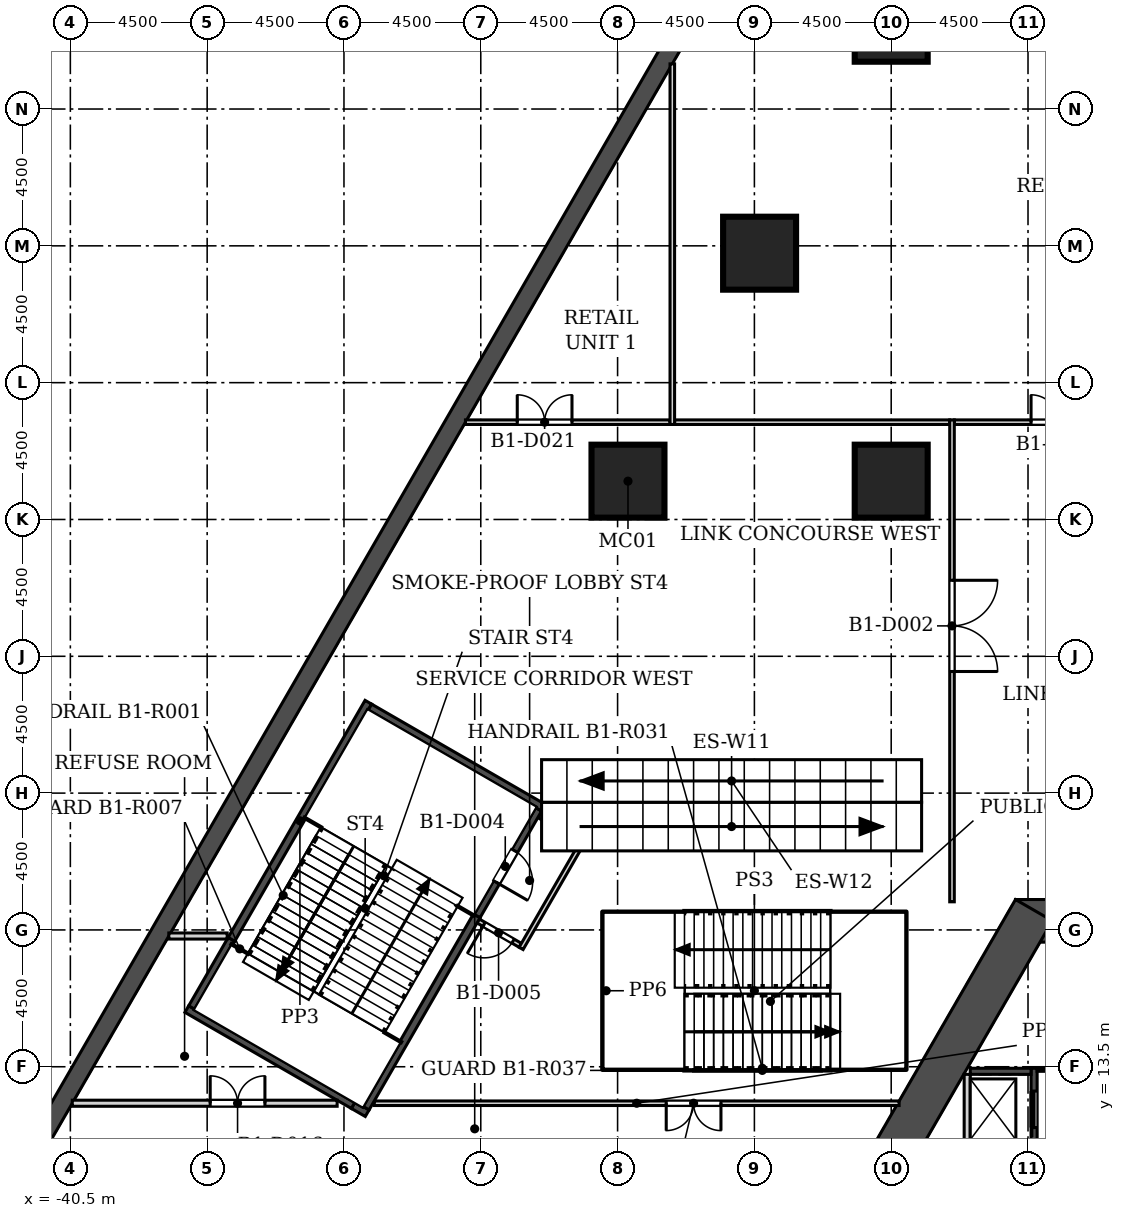
"""IFC4 building model, lengths in metres.
Left out: names, types, materials, properties, quantities, classifications, styles, units other than length and angle.
Written with IfcOpenShell. Run it as: python <this file> out.ifc"""

import sys

from ifc_helpers import new_model, si_unit, direction, frame, frame_2d, origin, origin_2d, place, context, subcontext, project, spatial, rectangle, extrude, element, fill, save


model = new_model("IFC4")
c1 = context("Model", 3, precision=1e-05, world=origin(), true_north=direction((0.0, 1.0)))
c2 = subcontext(c1, "Body", "Model", "MODEL_VIEW")
j1 = project(units=[si_unit("LENGTHUNIT", "METRE"), si_unit("PLANEANGLEUNIT", "RADIAN")], contexts=[c1])
p1 = place(None, origin())
s1 = spatial("IfcSite", under=j1, at=p1, CompositionType="ELEMENT")
p2 = place(p1, origin())
s2 = spatial("IfcBuilding", under=s1, at=p2, CompositionType="ELEMENT")
p3 = place(p2, frame((0.0, 0.0, -8.0)))
s3 = spatial("IfcBuildingStorey", under=s2, at=p3, CompositionType="ELEMENT", Elevation=-8.0)
p4 = place(p3, frame((-4.856, 74.528, 0.0), z_axis=(0.0, 0.0, 1.0), x_axis=(-0.499999312333, -0.866025800809, 0.0)))
e1 = element("IfcWall", 1, at=p4, inside=s3, PredefinedType="SOLIDWALL", context=c2, shape_type="SweptSolid", body=[
    extrude(rectangle(XDim=76.231, YDim=0.6, at=frame_2d((38.115, 0.0))), origin(), (0.0, 0.0, 1.0), 7.6),
])
for number, where, z_axis, x_axis in (
    (2, (-22.158, 32.76, 0.0), (0.0, 0.0, 1.0), (1.0, 0.0, 0.0)),
    (3, (-13.5, 47.756, 0.0), (0.0, 0.0, 1.0), (1.0, 0.0, 0.0)),
    (4, (-13.5, 32.76, 0.0), (0.0, 0.0, 1.0), (1.0, 0.0, 0.0)),
    (5, (-17.829, 40.258, 0.0), (0.0, 0.0, 1.0), (1.0, 0.0, 0.0)),
):
    element("IfcColumn", number, at=place(p3, frame(where, z_axis=z_axis, x_axis=x_axis)), inside=s3, PredefinedType="COLUMN", context=c2, shape_type="SweptSolid", body=[
        extrude(rectangle(XDim=2.4, YDim=2.4, at=origin_2d()), origin(), (0.0, 0.0, 1.0), 8.0),
    ])
p5 = place(p3, frame((9.412, 18.3, 0.0), z_axis=(0.0, 0.0, 1.0), x_axis=(-1.0, 0.0, 0.0)))
e6 = element("IfcWall", 6, at=p5, inside=s3, PredefinedType="SHEAR", context=c2, shape_type="SweptSolid", body=[
    extrude(rectangle(XDim=18.823, YDim=1.4, at=frame_2d((9.412, 0.0))), origin(), (0.0, 0.0, 1.0), 8.0),
])
p6 = place(p5, frame((8.711, 0.0, 0.0)))
e7 = element("IfcOpeningElement", 7, at=p6, cuts=e6, PredefinedType="OPENING", context=c2, shape_type="SweptSolid", body=[
    extrude(rectangle(XDim=1.4, YDim=2.1, at=frame_2d((0.7, 1.05))), frame((0.0, 0.71, 0.0), z_axis=(0.0, -1.0, 0.0), x_axis=(1.0, 0.0, 0.0)), (0.0, 0.0, 1.0), 1.42),
])
p7 = place(p5, frame((11.412, 0.0, 0.0)))
e8 = element("IfcOpeningElement", 8, at=p7, cuts=e6, PredefinedType="OPENING", context=c2, shape_type="SweptSolid", body=[
    extrude(rectangle(XDim=6.0, YDim=2.4, at=frame_2d((3.0, 1.2))), frame((0.0, 0.71, 0.0), z_axis=(0.0, -1.0, 0.0), x_axis=(1.0, 0.0, 0.0)), (0.0, 0.0, 1.0), 1.42),
])
p8 = place(p5, frame((1.412, 0.0, 0.0)))
e9 = element("IfcOpeningElement", 9, at=p8, cuts=e6, PredefinedType="OPENING", context=c2, shape_type="SweptSolid", body=[
    extrude(rectangle(XDim=6.0, YDim=2.4, at=frame_2d((3.0, 1.2))), frame((0.0, 0.71, 0.0), z_axis=(0.0, -1.0, 0.0), x_axis=(1.0, 0.0, 0.0)), (0.0, 0.0, 1.0), 1.42),
])
p9 = place(p3, frame((-8.805, 18.65, 0.0), z_axis=(0.0, 0.0, 1.0), x_axis=(-0.50000187635, -0.866024320471, 0.0)))
e10 = element("IfcWall", 10, at=p9, inside=s3, PredefinedType="SHEAR", context=c2, shape_type="SweptSolid", body=[
    extrude(rectangle(XDim=9.177, YDim=1.4, at=frame_2d((4.588, 0.0))), origin(), (0.0, 0.0, 1.0), 8.0),
])
p10 = place(p3, frame((-11.0, 5.85, 0.0), z_axis=(0.0, 0.0, 1.0), x_axis=(0.0, 1.0, 0.0)))
e11 = element("IfcWall", 11, at=p10, inside=s3, PredefinedType="SOLIDWALL", context=c2, shape_type="SweptSolid", body=[
    extrude(rectangle(XDim=7.4, YDim=0.2, at=frame_2d((3.7, 0.0))), origin(), (0.0, 0.0, 1.0), 7.6),
])
p11 = place(p3, frame((-8.8, 8.25, -0.35), z_axis=(0.0, 0.0, 1.0), x_axis=(0.0, 1.0, 0.0)))
e12 = element("IfcWall", 12, at=p11, inside=s3, PredefinedType="SOLIDWALL", context=c2, shape_type="SweptSolid", body=[
    extrude(rectangle(XDim=5.2, YDim=0.2, at=frame_2d((2.6, 0.0))), origin(), (0.0, 0.0, 1.0), 7.95),
])
p12 = place(p11, frame((0.75, 0.0, 0.35)))
e13 = element("IfcOpeningElement", 13, at=p12, cuts=e12, PredefinedType="OPENING", context=c2, shape_type="SweptSolid", body=[
    extrude(rectangle(XDim=1.2, YDim=2.1, at=frame_2d((0.6, 1.05))), frame((0.0, 0.11, 0.0), z_axis=(0.0, -1.0, 0.0), x_axis=(1.0, 0.0, 0.0)), (0.0, 0.0, 1.0), 0.22),
])
p13 = place(p11, frame((3.25, 0.0, 0.35)))
e14 = element("IfcOpeningElement", 14, at=p13, cuts=e12, PredefinedType="OPENING", context=c2, shape_type="SweptSolid", body=[
    extrude(rectangle(XDim=1.2, YDim=2.1, at=frame_2d((0.6, 1.05))), frame((0.0, 0.11, 0.0), z_axis=(0.0, -1.0, 0.0), x_axis=(1.0, 0.0, 0.0)), (0.0, 0.0, 1.0), 0.22),
])
p14 = place(p3, frame((-10.9, 13.35, -0.35), z_axis=(0.0, 0.0, 1.0), x_axis=(1.0, 0.0, 0.0)))
e15 = element("IfcWall", 15, at=p14, inside=s3, PredefinedType="SOLIDWALL", context=c2, shape_type="SweptSolid", body=[
    extrude(rectangle(XDim=2.0, YDim=0.2, at=frame_2d((1.0, 0.0))), origin(), (0.0, 0.0, 1.0), 7.95),
])
p15 = place(p3, frame((-8.7, 13.4, 0.0), z_axis=(0.0, 0.0, 1.0), x_axis=(1.0, 0.0, 0.0)))
e16 = element("IfcWall", 16, at=p15, inside=s3, PredefinedType="PARTITIONING", context=c2, shape_type="SweptSolid", body=[
    extrude(rectangle(XDim=2.8, YDim=0.1, at=frame_2d((1.4, 0.0))), origin(), (0.0, 0.0, 1.0), 7.6),
])
p16 = place(p15, frame((0.7, 0.0, 0.0)))
e17 = element("IfcOpeningElement", 17, at=p16, cuts=e16, PredefinedType="OPENING", context=c2, shape_type="SweptSolid", body=[
    extrude(rectangle(XDim=1.4, YDim=2.1, at=frame_2d((0.7, 1.05))), frame((0.0, 0.06, 0.0), z_axis=(0.0, -1.0, 0.0), x_axis=(1.0, 0.0, 0.0)), (0.0, 0.0, 1.0), 0.12),
])
p17 = place(p3, frame((-30.736, 11.972, 0.0), z_axis=(0.0, 0.0, 1.0), x_axis=(-0.866139611167, 0.499802134818, 0.0)))
e18 = element("IfcWall", 18, at=p17, inside=s3, PredefinedType="SOLIDWALL", context=c2, shape_type="SweptSolid", body=[
    extrude(rectangle(XDim=0.531, YDim=0.25, at=frame_2d((0.265, 0.0))), origin(), (0.0, 0.0, 1.0), 7.6),
])
p18 = place(p3, frame((-31.196, 12.238, 0.0), z_axis=(0.0, 0.0, 1.0), x_axis=(-0.866033115271, 0.499986643076, 0.0)))
e19 = element("IfcWall", 19, at=p18, inside=s3, PredefinedType="SOLIDWALL", context=c2, shape_type="SweptSolid", body=[
    extrude(rectangle(XDim=6.32, YDim=0.25, at=frame_2d((3.16, 0.0))), origin(), (0.0, 0.0, 1.0), 7.6),
])
p19 = place(p3, frame((-40.437, 12.3, 0.0), z_axis=(0.0, 0.0, 1.0), x_axis=(1.0, 0.0, 0.0)))
e20 = element("IfcWall", 20, at=p19, inside=s3, PredefinedType="PARTITIONING", context=c2, shape_type="SweptSolid", body=[
    extrude(rectangle(XDim=8.713, YDim=0.2, at=frame_2d((4.356, 0.0))), origin(), (0.0, 0.0, 1.0), 7.6),
])
p20 = place(p19, frame((4.537, 0.0, 0.0)))
e21 = element("IfcOpeningElement", 21, at=p20, cuts=e20, PredefinedType="OPENING", context=c2, shape_type="SweptSolid", body=[
    extrude(rectangle(XDim=1.8, YDim=2.1, at=frame_2d((0.9, 1.05))), frame((0.0, 0.11, 0.0), z_axis=(0.0, -1.0, 0.0), x_axis=(1.0, 0.0, 0.0)), (0.0, 0.0, 1.0), 0.22),
])
p21 = place(p3, frame((-30.502, 12.3, 0.0), z_axis=(0.0, 0.0, 1.0), x_axis=(1.0, 0.0, 0.0)))
e22 = element("IfcWall", 22, at=p21, inside=s3, PredefinedType="PARTITIONING", context=c2, shape_type="SweptSolid", body=[
    extrude(rectangle(XDim=17.263, YDim=0.15, at=frame_2d((8.631, 0.0))), origin(), (0.0, 0.0, 1.0), 7.6),
])
p22 = place(p21, frame((9.602, 0.0, 0.0)))
e23 = element("IfcOpeningElement", 23, at=p22, cuts=e22, PredefinedType="OPENING", context=c2, shape_type="SweptSolid", body=[
    extrude(rectangle(XDim=1.8, YDim=2.1, at=frame_2d((0.9, 1.05))), frame((0.0, 0.085, 0.0), z_axis=(0.0, -1.0, 0.0), x_axis=(1.0, 0.0, 0.0)), (0.0, 0.0, 1.0), 0.17),
])
p23 = place(p3, frame((-36.498, 15.443, 0.0), z_axis=(0.0, 0.0, 1.0), x_axis=(0.499972073481, 0.866041526567, 0.0)))
e24 = element("IfcWall", 24, at=p23, inside=s3, PredefinedType="SOLIDWALL", context=c2, shape_type="SweptSolid", body=[
    extrude(rectangle(XDim=2.596, YDim=0.25, at=frame_2d((1.298, 0.0))), origin(), (0.0, 0.0, 1.0), 7.6),
])
p24 = place(p3, frame((-25.701, 17.494, 0.0), z_axis=(0.0, 0.0, 1.0), x_axis=(-0.866028054938, 0.499995408039, 0.0)))
e25 = element("IfcWall", 25, at=p24, inside=s3, PredefinedType="PARTITIONING", context=c2, shape_type="SweptSolid", body=[
    extrude(rectangle(XDim=1.6, YDim=0.15, at=frame_2d((0.8, 0.0))), origin(), (0.0, 0.0, 1.0), 7.6),
])
p25 = place(p24, frame((0.275, 0.0, 0.0)))
e26 = element("IfcOpeningElement", 26, at=p25, cuts=e25, PredefinedType="OPENING", context=c2, shape_type="SweptSolid", body=[
    extrude(rectangle(XDim=1.1, YDim=2.1, at=frame_2d((0.55, 1.05))), frame((0.0, 0.085, 0.0), z_axis=(0.0, -1.0, 0.0), x_axis=(1.0, 0.0, 0.0)), (0.0, 0.0, 1.0), 0.17),
])
p26 = place(p3, frame((-35.199, 17.692, 0.0), z_axis=(0.0, 0.0, 1.0), x_axis=(0.49997126526, 0.866041993159, 0.0)))
e27 = element("IfcWall", 27, at=p26, inside=s3, PredefinedType="SOLIDWALL", context=c2, shape_type="SweptSolid", body=[
    extrude(rectangle(XDim=9.003, YDim=0.25, at=frame_2d((4.502, 0.0))), origin(), (0.0, 0.0, 1.0), 7.6),
])
p27 = place(p3, frame((-37.261, 17.8, 0.0), z_axis=(0.0, 0.0, 1.0), x_axis=(1.0, 0.0, 0.0)))
e28 = element("IfcWall", 28, at=p27, inside=s3, PredefinedType="PARTITIONING", context=c2, shape_type="SweptSolid", body=[
    extrude(rectangle(XDim=1.92, YDim=0.2, at=frame_2d((0.96, 0.0))), origin(), (0.0, 0.0, 1.0), 6.85),
])
p28 = place(p3, frame((-27.132, 18.465, 0.0), z_axis=(0.0, 0.0, 1.0), x_axis=(-0.499977226672, -0.866038551572, 0.0)))
e29 = element("IfcWall", 29, at=p28, inside=s3, PredefinedType="SOLIDWALL", context=c2, shape_type="SweptSolid", body=[
    extrude(rectangle(XDim=7.3, YDim=0.25, at=frame_2d((3.65, 0.0))), origin(), (0.0, 0.0, 1.0), 7.6),
])
p29 = place(p3, frame((-23.598, 20.986, 0.0), z_axis=(0.0, 0.0, 1.0), x_axis=(-0.499922756636, -0.866069995669, 0.0)))
e30 = element("IfcWall", 30, at=p29, inside=s3, PredefinedType="PARTITIONING", context=c2, shape_type="SweptSolid", body=[
    extrude(rectangle(XDim=4.15, YDim=0.15, at=frame_2d((2.075, 0.0))), origin(), (0.0, 0.0, 1.0), 7.6),
])
p30 = place(p3, frame((-25.087, 21.759, 0.0), z_axis=(0.0, 0.0, 1.0), x_axis=(0.866038271014, -0.499977712642, 0.0)))
e31 = element("IfcWall", 31, at=p30, inside=s3, PredefinedType="PARTITIONING", context=c2, shape_type="SweptSolid", body=[
    extrude(rectangle(XDim=1.601, YDim=0.15, at=frame_2d((0.8, 0.0))), origin(), (0.0, 0.0, 1.0), 7.6),
])
p31 = place(p3, frame((-25.107, 21.972, 0.0), z_axis=(0.0, 0.0, 1.0), x_axis=(-0.499990325971, -0.866030989016, 0.0)))
e32 = element("IfcWall", 32, at=p31, inside=s3, PredefinedType="SOLIDWALL", context=c2, shape_type="SweptSolid", body=[
    extrude(rectangle(XDim=4.05, YDim=0.25, at=frame_2d((2.025, 0.0))), origin(), (0.0, 0.0, 1.0), 7.6),
])
p32 = place(p31, frame((1.575, 0.0, 0.0)))
e33 = element("IfcOpeningElement", 33, at=p32, cuts=e32, PredefinedType="OPENING", context=c2, shape_type="SweptSolid", body=[
    extrude(rectangle(XDim=1.2, YDim=2.1, at=frame_2d((0.6, 1.05))), frame((0.0, 0.135, 0.0), z_axis=(0.0, -1.0, 0.0), x_axis=(1.0, 0.0, 0.0)), (0.0, 0.0, 1.0), 0.27),
])
p33 = place(p3, frame((-30.652, 25.318, 0.0), z_axis=(0.0, 0.0, 1.0), x_axis=(0.866040211805, -0.499974350878, 0.0)))
e34 = element("IfcWall", 34, at=p33, inside=s3, PredefinedType="SOLIDWALL", context=c2, shape_type="SweptSolid", body=[
    extrude(rectangle(XDim=6.6, YDim=0.25, at=frame_2d((3.3, 0.0))), origin(), (0.0, 0.0, 1.0), 7.6),
])
p34 = place(p3, frame((-20.775, 34.7, 0.0), z_axis=(0.0, 0.0, 1.0), x_axis=(-1.0, 0.0, 0.0)))
e35 = element("IfcWall", 35, at=p34, inside=s3, PredefinedType="PARTITIONING", context=c2, shape_type="SweptSolid", body=[
    extrude(rectangle(XDim=6.729, YDim=0.15, at=frame_2d((3.365, 0.0))), origin(), (0.0, 0.0, 1.0), 7.6),
])
p35 = place(p34, frame((3.225, 0.0, 0.0)))
e36 = element("IfcOpeningElement", 36, at=p35, cuts=e35, PredefinedType="OPENING", context=c2, shape_type="SweptSolid", body=[
    extrude(rectangle(XDim=1.8, YDim=2.1, at=frame_2d((0.9, 1.05))), frame((0.0, 0.085, 0.0), z_axis=(0.0, -1.0, 0.0), x_axis=(1.0, 0.0, 0.0)), (0.0, 0.0, 1.0), 0.17),
])
p36 = place(p3, frame((-11.575, 34.7, 0.0), z_axis=(0.0, 0.0, 1.0), x_axis=(-1.0, 0.0, 0.0)))
e37 = element("IfcWall", 37, at=p36, inside=s3, PredefinedType="PARTITIONING", context=c2, shape_type="SweptSolid", body=[
    extrude(rectangle(XDim=9.05, YDim=0.15, at=frame_2d((4.525, 0.0))), origin(), (0.0, 0.0, 1.0), 7.6),
])
p37 = place(p3, frame((-4.105, 34.7, 0.0), z_axis=(0.0, 0.0, 1.0), x_axis=(-1.0, 0.0, 0.0)))
e38 = element("IfcWall", 38, at=p37, inside=s3, PredefinedType="PARTITIONING", context=c2, shape_type="SweptSolid", body=[
    extrude(rectangle(XDim=7.32, YDim=0.15, at=frame_2d((3.66, 0.0))), origin(), (0.0, 0.0, 1.0), 7.6),
])
p38 = place(p37, frame((2.995, 0.0, 0.0)))
e39 = element("IfcOpeningElement", 39, at=p38, cuts=e38, PredefinedType="OPENING", context=c2, shape_type="SweptSolid", body=[
    extrude(rectangle(XDim=1.8, YDim=2.1, at=frame_2d((0.9, 1.05))), frame((0.0, 0.085, 0.0), z_axis=(0.0, -1.0, 0.0), x_axis=(1.0, 0.0, 0.0)), (0.0, 0.0, 1.0), 0.17),
])
p39 = place(p3, frame((-11.5, 34.775, 0.0), z_axis=(0.0, 0.0, 1.0), x_axis=(0.0, -1.0, 0.0)))
e40 = element("IfcWall", 40, at=p39, inside=s3, PredefinedType="PARTITIONING", context=c2, shape_type="SweptSolid", body=[
    extrude(rectangle(XDim=15.85, YDim=0.15, at=frame_2d((7.925, 0.0))), origin(), (0.0, 0.0, 1.0), 7.6),
])
p40 = place(p39, frame((5.275, 0.0, 0.0)))
e41 = element("IfcOpeningElement", 41, at=p40, cuts=e40, PredefinedType="OPENING", context=c2, shape_type="SweptSolid", body=[
    extrude(rectangle(XDim=3.0, YDim=2.4, at=frame_2d((1.5, 1.2))), frame((0.0, 0.085, 0.0), z_axis=(0.0, -1.0, 0.0), x_axis=(1.0, 0.0, 0.0)), (0.0, 0.0, 1.0), 0.17),
])
p41 = place(p3, frame((-20.7, 46.485, 0.0), z_axis=(0.0, 0.0, 1.0), x_axis=(0.0, -1.0, 0.0)))
e42 = element("IfcWall", 42, at=p41, inside=s3, PredefinedType="PARTITIONING", context=c2, shape_type="SweptSolid", body=[
    extrude(rectangle(XDim=11.86, YDim=0.15, at=frame_2d((5.93, 0.0))), origin(), (0.0, 0.0, 1.0), 7.6),
])
p42 = place(p3, frame((-13.125, 13.45, 0.0), z_axis=(0.0, 0.0, 1.0), x_axis=(0.0, 1.0, 0.0)))
e43 = element("IfcWall", 43, at=p42, inside=s3, PredefinedType="SOLIDWALL", context=c2, shape_type="SweptSolid", body=[
    extrude(rectangle(XDim=5.1, YDim=0.25, at=frame_2d((2.55, 0.0))), origin(), (0.0, 0.0, 1.0), 7.6),
])
for number, where, z_axis, x_axis in (
    (44, (-13.125, 13.525, 0.0), (0.0, 0.0, 1.0), (-1.0, 0.0, 0.0)),
    (45, (-13.125, 18.475, 0.0), (0.0, 0.0, 1.0), (-1.0, 0.0, 0.0)),
):
    element("IfcWall", number, at=place(p3, frame(where, z_axis=z_axis, x_axis=x_axis)), inside=s3, PredefinedType="SOLIDWALL", context=c2, shape_type="SweptSolid", body=[
        extrude(rectangle(XDim=2.25, YDim=0.25, at=frame_2d((1.125, 0.0))), origin(), (0.0, 0.0, 1.0), 7.6),
    ])
p43 = place(p3, frame((-22.875, 13.45, 0.0), z_axis=(0.0, 0.0, 1.0), x_axis=(0.0, 1.0, 0.0)))
e46 = element("IfcWall", 46, at=p43, inside=s3, PredefinedType="SOLIDWALL", context=c2, shape_type="SweptSolid", body=[
    extrude(rectangle(XDim=5.1, YDim=0.25, at=frame_2d((2.55, 0.0))), origin(), (0.0, 0.0, 1.0), 7.6),
])
for number, where, z_axis, x_axis in (
    (47, (-22.875, 13.525, 0.0), (0.0, 0.0, 1.0), (1.0, 0.0, 0.0)),
    (48, (-22.875, 18.475, 0.0), (0.0, 0.0, 1.0), (1.0, 0.0, 0.0)),
):
    element("IfcWall", number, at=place(p3, frame(where, z_axis=z_axis, x_axis=x_axis)), inside=s3, PredefinedType="SOLIDWALL", context=c2, shape_type="SweptSolid", body=[
        extrude(rectangle(XDim=2.45, YDim=0.25, at=frame_2d((1.225, 0.0))), origin(), (0.0, 0.0, 1.0), 7.6),
    ])
p44 = place(p13, origin())
e49 = element("IfcDoor", 49, at=p44, inside=s3, OperationType="SLIDING_TO_LEFT", PredefinedType="DOOR", context=c2, shape_type="SweptSolid", body=[
    extrude(rectangle(XDim=1.2, YDim=2.1, at=frame_2d((0.6, 1.05))), frame((0.0, 0.025, 0.0), z_axis=(0.0, -1.0, 0.0), x_axis=(1.0, 0.0, 0.0)), (0.0, 0.0, 1.0), 0.05),
])
fill(e14, e49)
p45 = place(p40, origin())
e50 = element("IfcDoor", 50, at=p45, inside=s3, OperationType="DOUBLE_DOOR_SINGLE_SWING", PredefinedType="DOOR", context=c2, shape_type="SweptSolid", body=[
    extrude(rectangle(XDim=3.0, YDim=2.4, at=frame_2d((1.5, 1.2))), frame((0.0, 0.025, 0.0), z_axis=(0.0, -1.0, 0.0), x_axis=(1.0, 0.0, 0.0)), (0.0, 0.0, 1.0), 0.05),
])
fill(e41, e50)
p46 = place(p32, origin())
e51 = element("IfcDoor", 51, at=p46, inside=s3, OperationType="SINGLE_SWING_RIGHT", PredefinedType="DOOR", context=c2, shape_type="SweptSolid", body=[
    extrude(rectangle(XDim=1.2, YDim=2.1, at=frame_2d((0.6, 1.05))), frame((0.0, 0.025, 0.0), z_axis=(0.0, -1.0, 0.0), x_axis=(1.0, 0.0, 0.0)), (0.0, 0.0, 1.0), 0.05),
])
fill(e33, e51)
p47 = place(p25, origin())
e52 = element("IfcDoor", 52, at=p47, inside=s3, OperationType="SINGLE_SWING_RIGHT", PredefinedType="DOOR", context=c2, shape_type="SweptSolid", body=[
    extrude(rectangle(XDim=1.1, YDim=2.1, at=frame_2d((0.55, 1.05))), frame((0.0, 0.025, 0.0), z_axis=(0.0, -1.0, 0.0), x_axis=(1.0, 0.0, 0.0)), (0.0, 0.0, 1.0), 0.05),
])
fill(e26, e52)
p48 = place(p20, origin())
e53 = element("IfcDoor", 53, at=p48, inside=s3, OperationType="DOUBLE_DOOR_SINGLE_SWING", PredefinedType="DOOR", context=c2, shape_type="SweptSolid", body=[
    extrude(rectangle(XDim=1.8, YDim=2.1, at=frame_2d((0.9, 1.05))), frame((0.0, 0.025, 0.0), z_axis=(0.0, -1.0, 0.0), x_axis=(1.0, 0.0, 0.0)), (0.0, 0.0, 1.0), 0.05),
])
fill(e21, e53)
p49 = place(p22, frame((1.8, 0.0, 0.0), z_axis=(0.0, 0.0, 1.0), x_axis=(-1.0, 0.0, 0.0)))
e54 = element("IfcDoor", 54, at=p49, inside=s3, OperationType="DOUBLE_DOOR_SINGLE_SWING", PredefinedType="DOOR", context=c2, shape_type="SweptSolid", body=[
    extrude(rectangle(XDim=1.8, YDim=2.1, at=frame_2d((0.9, 1.05))), frame((0.0, 0.025, 0.0), z_axis=(0.0, -1.0, 0.0), x_axis=(1.0, 0.0, 0.0)), (0.0, 0.0, 1.0), 0.05),
])
fill(e23, e54)
p50 = place(p35, frame((1.8, 0.0, 0.0), z_axis=(0.0, 0.0, 1.0), x_axis=(-1.0, 0.0, 0.0)))
e55 = element("IfcDoor", 55, at=p50, inside=s3, OperationType="DOUBLE_DOOR_SINGLE_SWING", PredefinedType="DOOR", context=c2, shape_type="SweptSolid", body=[
    extrude(rectangle(XDim=1.8, YDim=2.1, at=frame_2d((0.9, 1.05))), frame((0.0, 0.025, 0.0), z_axis=(0.0, -1.0, 0.0), x_axis=(1.0, 0.0, 0.0)), (0.0, 0.0, 1.0), 0.05),
])
fill(e36, e55)
p51 = place(p38, frame((1.8, 0.0, 0.0), z_axis=(0.0, 0.0, 1.0), x_axis=(-1.0, 0.0, 0.0)))
e56 = element("IfcDoor", 56, at=p51, inside=s3, OperationType="DOUBLE_DOOR_SINGLE_SWING", PredefinedType="DOOR", context=c2, shape_type="SweptSolid", body=[
    extrude(rectangle(XDim=1.8, YDim=2.1, at=frame_2d((0.9, 1.05))), frame((0.0, 0.025, 0.0), z_axis=(0.0, -1.0, 0.0), x_axis=(1.0, 0.0, 0.0)), (0.0, 0.0, 1.0), 0.05),
])
fill(e39, e56)
save(model, sys.argv[1])
